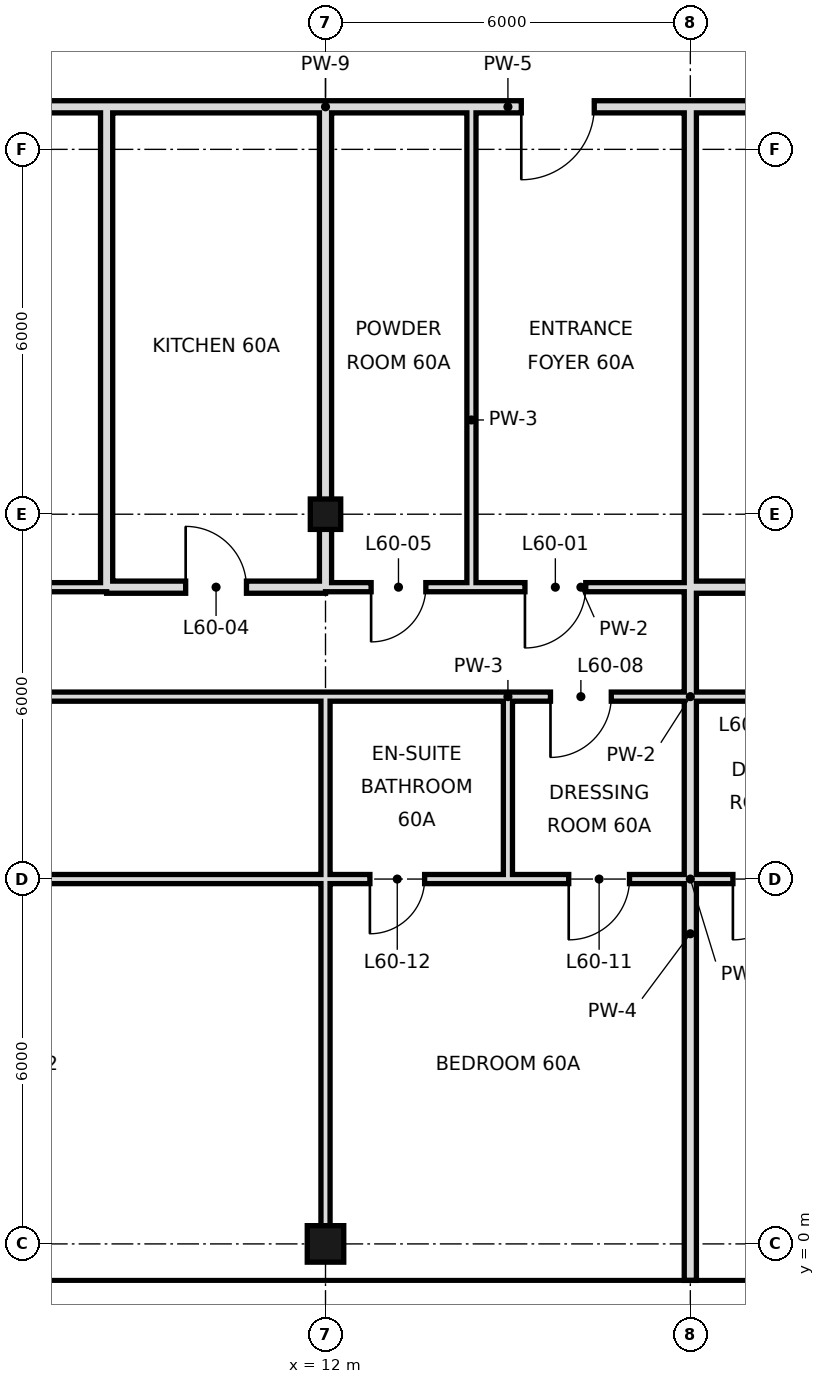
"""IFC4 building model, lengths in metres.
Left out: names, types, materials, properties, quantities, classifications, styles, units other than length and angle.
Written with IfcOpenShell. Run it as: python <this file> out.ifc"""

import sys

from ifc_helpers import new_model, si_unit, direction, frame, frame_2d, origin, origin_2d, place, context, subcontext, project, spatial, rectangle, hollow_rectangle, extrude, element, fill, save


model = new_model("IFC4")
c1 = context("Model", 3, precision=1e-05, world=origin(), true_north=direction((0.0, 1.0)))
c2 = subcontext(c1, "Body", "Model", "MODEL_VIEW")
j1 = project(units=[si_unit("LENGTHUNIT", "METRE"), si_unit("PLANEANGLEUNIT", "RADIAN")], contexts=[c1])
p1 = place(None, origin())
s1 = spatial("IfcSite", under=j1, at=p1, CompositionType="ELEMENT")
p2 = place(p1, origin())
s2 = spatial("IfcBuilding", under=s1, at=p2, CompositionType="ELEMENT")
p3 = place(p2, frame((0.0, 0.0, 254.0)))
s3 = spatial("IfcBuildingStorey", under=s2, at=p3, CompositionType="ELEMENT", Elevation=254.0)
p4 = place(p3, frame((12.0, 0.0, 0.0), z_axis=(0.0, 0.0, 1.0), x_axis=(1.0, 0.0, 0.0)))
e1 = element("IfcColumn", 1, at=p4, inside=s3, PredefinedType="COLUMN", context=c2, shape_type="SweptSolid", body=[
    extrude(hollow_rectangle(XDim=0.6, YDim=0.6, WallThickness=0.028, at=origin_2d()), origin(), (0.0, 0.0, 1.0), 3.6),
])
p5 = place(p3, frame((12.0, 12.0, 0.0), z_axis=(0.0, 0.0, 1.0), x_axis=(1.0, 0.0, 0.0)))
e2 = element("IfcColumn", 2, at=p5, inside=s3, PredefinedType="COLUMN", context=c2, shape_type="SweptSolid", body=[
    extrude(hollow_rectangle(XDim=0.5, YDim=0.5, WallThickness=0.025, at=origin_2d()), origin(), (0.0, 0.0, 1.0), 3.6),
])
p6 = place(p3, frame((12.0, 10.8, 0.0), z_axis=(0.0, 0.0, 1.0), x_axis=(0.0, 1.0, 0.0)))
e3 = element("IfcWall", 3, at=p6, inside=s3, PredefinedType="SOLIDWALL", context=c2, shape_type="SweptSolid", body=[
    extrude(rectangle(XDim=7.9, YDim=0.2, at=frame_2d((3.95, 0.0))), origin(), (0.0, 0.0, 1.0), 2.68),
])
p7 = place(p3, frame((12.0, 0.0, 0.0), z_axis=(0.0, 0.0, 1.0), x_axis=(0.0, 1.0, 0.0)))
e4 = element("IfcWall", 4, at=p7, inside=s3, PredefinedType="PARTITIONING", context=c2, shape_type="SweptSolid", body=[
    extrude(rectangle(XDim=6.0, YDim=0.15, at=frame_2d((3.0, 0.0))), origin(), (0.0, 0.0, 1.0), 2.68),
])
p8 = place(p3, frame((12.0, 6.0, 0.0), z_axis=(0.0, 0.0, 1.0), x_axis=(0.0, 1.0, 0.0)))
e5 = element("IfcWall", 5, at=p8, inside=s3, PredefinedType="PARTITIONING", context=c2, shape_type="SweptSolid", body=[
    extrude(rectangle(XDim=3.0, YDim=0.15, at=frame_2d((1.5, 0.0))), origin(), (0.0, 0.0, 1.0), 2.68),
])
p9 = place(p3, frame((14.4, 10.8, 0.0), z_axis=(0.0, 0.0, 1.0), x_axis=(0.0, 1.0, 0.0)))
e6 = element("IfcWall", 6, at=p9, inside=s3, PredefinedType="PARTITIONING", context=c2, shape_type="SweptSolid", body=[
    extrude(rectangle(XDim=7.9, YDim=0.15, at=frame_2d((3.95, 0.0))), origin(), (0.0, 0.0, 1.0), 3.38),
])
p10 = place(p3, frame((15.0, 6.0, 0.0), z_axis=(0.0, 0.0, 1.0), x_axis=(0.0, 1.0, 0.0)))
e7 = element("IfcWall", 7, at=p10, inside=s3, PredefinedType="PARTITIONING", context=c2, shape_type="SweptSolid", body=[
    extrude(rectangle(XDim=3.0, YDim=0.15, at=frame_2d((1.5, 0.0))), origin(), (0.0, 0.0, 1.0), 3.38),
])
p11 = place(p3, frame((18.0, 10.8, 0.0), z_axis=(0.0, 0.0, 1.0), x_axis=(0.0, 1.0, 0.0)))
e8 = element("IfcWall", 8, at=p11, inside=s3, PredefinedType="SOLIDWALL", context=c2, shape_type="SweptSolid", body=[
    extrude(rectangle(XDim=7.9, YDim=0.2, at=frame_2d((3.95, 0.0))), origin(), (0.0, 0.0, 1.0), 2.68),
])
p12 = place(p3, frame((18.0, -0.6, 0.0), z_axis=(0.0, 0.0, 1.0), x_axis=(0.0, 1.0, 0.0)))
e9 = element("IfcWall", 9, at=p12, inside=s3, PredefinedType="SOLIDWALL", context=c2, shape_type="SweptSolid", body=[
    extrude(rectangle(XDim=11.4, YDim=0.2, at=frame_2d((5.7, 0.0))), origin(), (0.0, 0.0, 1.0), 2.68),
])
p13 = place(p3, frame((8.4, 10.8, 0.0), z_axis=(0.0, 0.0, 1.0), x_axis=(0.0, 1.0, 0.0)))
e10 = element("IfcWall", 10, at=p13, inside=s3, PredefinedType="SOLIDWALL", context=c2, shape_type="SweptSolid", body=[
    extrude(rectangle(XDim=7.9, YDim=0.2, at=frame_2d((3.95, 0.0))), origin(), (0.0, 0.0, 1.0), 2.68),
])
p14 = place(p3, frame((8.4, 10.8, 0.0), z_axis=(0.0, 0.0, 1.0), x_axis=(1.0, 0.0, 0.0)))
e11 = element("IfcWall", 11, at=p14, inside=s3, PredefinedType="SOLIDWALL", context=c2, shape_type="SweptSolid", body=[
    extrude(rectangle(XDim=3.6, YDim=0.2, at=frame_2d((1.8, 0.0))), origin(), (0.0, 0.0, 1.0), 2.68),
])
p15 = place(p14, frame((1.3, 0.0, 0.0)))
e12 = element("IfcOpeningElement", 12, at=p15, cuts=e11, PredefinedType="OPENING", context=c2, shape_type="SweptSolid", body=[
    extrude(rectangle(XDim=1.0, YDim=2.4, at=frame_2d((0.5, 1.2))), frame((0.0, 0.11, 0.0), z_axis=(0.0, -1.0, 0.0), x_axis=(1.0, 0.0, 0.0)), (0.0, 0.0, 1.0), 0.22),
])
p16 = place(p3, frame((18.0, 10.8, 0.0), z_axis=(0.0, 0.0, 1.0), x_axis=(1.0, 0.0, 0.0)))
e13 = element("IfcWall", 13, at=p16, inside=s3, PredefinedType="SOLIDWALL", context=c2, shape_type="SweptSolid", body=[
    extrude(rectangle(XDim=5.4, YDim=0.2, at=frame_2d((2.7, 0.0))), origin(), (0.0, 0.0, 1.0), 2.68),
])
p17 = place(p16, frame((2.2, 0.0, 0.0)))
e14 = element("IfcOpeningElement", 14, at=p17, cuts=e13, PredefinedType="OPENING", context=c2, shape_type="SweptSolid", body=[
    extrude(rectangle(XDim=1.0, YDim=2.4, at=frame_2d((0.5, 1.2))), frame((0.0, 0.11, 0.0), z_axis=(0.0, -1.0, 0.0), x_axis=(1.0, 0.0, 0.0)), (0.0, 0.0, 1.0), 0.22),
])
p18 = place(p3, frame((-12.6, 10.8, 0.0), z_axis=(0.0, 0.0, 1.0), x_axis=(1.0, 0.0, 0.0)))
e15 = element("IfcWall", 15, at=p18, inside=s3, PredefinedType="PARTITIONING", context=c2, shape_type="SweptSolid", body=[
    extrude(rectangle(XDim=21.0, YDim=0.15, at=frame_2d((10.5, 0.0))), origin(), (0.0, 0.0, 1.0), 3.38),
])
p19 = place(p18, frame((10.3, 0.0, 0.0)))
e16 = element("IfcOpeningElement", 16, at=p19, cuts=e15, PredefinedType="OPENING", context=c2, shape_type="SweptSolid", body=[
    extrude(rectangle(XDim=1.0, YDim=2.4, at=frame_2d((0.5, 1.2))), frame((0.0, 0.085, 0.0), z_axis=(0.0, -1.0, 0.0), x_axis=(1.0, 0.0, 0.0)), (0.0, 0.0, 1.0), 0.17),
])
p20 = place(p18, frame((17.68, 0.0, 0.0)))
e17 = element("IfcOpeningElement", 17, at=p20, cuts=e15, PredefinedType="OPENING", context=c2, shape_type="SweptSolid", body=[
    extrude(rectangle(XDim=1.0, YDim=2.4, at=frame_2d((0.5, 1.2))), frame((0.0, 0.085, 0.0), z_axis=(0.0, -1.0, 0.0), x_axis=(1.0, 0.0, 0.0)), (0.0, 0.0, 1.0), 0.17),
])
p21 = place(p3, frame((14.4, 10.8, 0.0), z_axis=(0.0, 0.0, 1.0), x_axis=(1.0, 0.0, 0.0)))
e18 = element("IfcWall", 18, at=p21, inside=s3, PredefinedType="PARTITIONING", context=c2, shape_type="SweptSolid", body=[
    extrude(rectangle(XDim=3.6, YDim=0.15, at=frame_2d((1.8, 0.0))), origin(), (0.0, 0.0, 1.0), 3.38),
])
p22 = place(p21, frame((0.88, 0.0, 0.0)))
e19 = element("IfcOpeningElement", 19, at=p22, cuts=e18, PredefinedType="OPENING", context=c2, shape_type="SweptSolid", body=[
    extrude(rectangle(XDim=1.0, YDim=2.4, at=frame_2d((0.5, 1.2))), frame((0.0, 0.085, 0.0), z_axis=(0.0, -1.0, 0.0), x_axis=(1.0, 0.0, 0.0)), (0.0, 0.0, 1.0), 0.17),
])
p23 = place(p3, frame((12.0, 10.8, 0.0), z_axis=(0.0, 0.0, 1.0), x_axis=(1.0, 0.0, 0.0)))
e20 = element("IfcWall", 20, at=p23, inside=s3, PredefinedType="PARTITIONING", context=c2, shape_type="SweptSolid", body=[
    extrude(rectangle(XDim=2.4, YDim=0.15, at=frame_2d((1.2, 0.0))), origin(), (0.0, 0.0, 1.0), 3.38),
])
p24 = place(p23, frame((0.75, 0.0, 0.0)))
e21 = element("IfcOpeningElement", 21, at=p24, cuts=e20, PredefinedType="OPENING", context=c2, shape_type="SweptSolid", body=[
    extrude(rectangle(XDim=0.9, YDim=2.4, at=frame_2d((0.45, 1.2))), frame((0.0, 0.085, 0.0), z_axis=(0.0, -1.0, 0.0), x_axis=(1.0, 0.0, 0.0)), (0.0, 0.0, 1.0), 0.17),
])
p25 = place(p3, frame((3.1, 18.7, 0.0), z_axis=(0.0, 0.0, 1.0), x_axis=(1.0, 0.0, 0.0)))
e22 = element("IfcWall", 22, at=p25, inside=s3, PredefinedType="SOLIDWALL", context=c2, shape_type="SweptSolid", body=[
    extrude(rectangle(XDim=5.3, YDim=0.2, at=frame_2d((2.65, 0.0))), origin(), (0.0, 0.0, 1.0), 2.68),
])
p26 = place(p3, frame((12.0, 18.7, 0.0), z_axis=(0.0, 0.0, 1.0), x_axis=(1.0, 0.0, 0.0)))
e23 = element("IfcWall", 23, at=p26, inside=s3, PredefinedType="SOLIDWALL", context=c2, shape_type="SweptSolid", body=[
    extrude(rectangle(XDim=6.0, YDim=0.2, at=frame_2d((3.0, 0.0))), origin(), (0.0, 0.0, 1.0), 2.68),
])
p27 = place(p26, frame((3.22, 0.0, 0.0)))
e24 = element("IfcOpeningElement", 24, at=p27, cuts=e23, PredefinedType="OPENING", context=c2, shape_type="SweptSolid", body=[
    extrude(rectangle(XDim=1.2, YDim=2.4, at=frame_2d((0.6, 1.2))), frame((0.0, 0.11, 0.0), z_axis=(0.0, -1.0, 0.0), x_axis=(1.0, 0.0, 0.0)), (0.0, 0.0, 1.0), 0.22),
])
p28 = place(p3, frame((8.4, 18.7, 0.0), z_axis=(0.0, 0.0, 1.0), x_axis=(1.0, 0.0, 0.0)))
e25 = element("IfcWall", 25, at=p28, inside=s3, PredefinedType="SOLIDWALL", context=c2, shape_type="SweptSolid", body=[
    extrude(rectangle(XDim=3.6, YDim=0.2, at=frame_2d((1.8, 0.0))), origin(), (0.0, 0.0, 1.0), 3.38),
])
p29 = place(p3, frame((18.0, 18.7, 0.0), z_axis=(0.0, 0.0, 1.0), x_axis=(1.0, 0.0, 0.0)))
e26 = element("IfcWall", 26, at=p29, inside=s3, PredefinedType="SOLIDWALL", context=c2, shape_type="SweptSolid", body=[
    extrude(rectangle(XDim=5.4, YDim=0.2, at=frame_2d((2.7, 0.0))), origin(), (0.0, 0.0, 1.0), 2.68),
])
p30 = place(p3, frame((-12.0, 6.0, 0.0), z_axis=(0.0, 0.0, 1.0), x_axis=(1.0, 0.0, 0.0)))
e27 = element("IfcWall", 27, at=p30, inside=s3, PredefinedType="PARTITIONING", context=c2, shape_type="SweptSolid", body=[
    extrude(rectangle(XDim=24.0, YDim=0.15, at=frame_2d((12.0, 0.0))), origin(), (0.0, 0.0, 1.0), 2.68),
])
p31 = place(p30, frame((9.95, 0.0, 0.0)))
e28 = element("IfcOpeningElement", 28, at=p31, cuts=e27, PredefinedType="OPENING", context=c2, shape_type="SweptSolid", body=[
    extrude(rectangle(XDim=1.8, YDim=2.4, at=frame_2d((0.9, 1.2))), frame((0.0, 0.085, 0.0), z_axis=(0.0, -1.0, 0.0), x_axis=(1.0, 0.0, 0.0)), (0.0, 0.0, 1.0), 0.17),
])
p32 = place(p30, frame((15.16, 0.0, 0.0)))
e29 = element("IfcOpeningElement", 29, at=p32, cuts=e27, PredefinedType="OPENING", context=c2, shape_type="SweptSolid", body=[
    extrude(rectangle(XDim=1.8, YDim=2.4, at=frame_2d((0.9, 1.2))), frame((0.0, 0.085, 0.0), z_axis=(0.0, -1.0, 0.0), x_axis=(1.0, 0.0, 0.0)), (0.0, 0.0, 1.0), 0.17),
])
p33 = place(p3, frame((15.0, 6.0, 0.0), z_axis=(0.0, 0.0, 1.0), x_axis=(1.0, 0.0, 0.0)))
e30 = element("IfcWall", 30, at=p33, inside=s3, PredefinedType="PARTITIONING", context=c2, shape_type="SweptSolid", body=[
    extrude(rectangle(XDim=6.0, YDim=0.15, at=frame_2d((3.0, 0.0))), origin(), (0.0, 0.0, 1.0), 2.93),
])
p34 = place(p33, frame((1.0, 0.0, 0.0)))
e31 = element("IfcOpeningElement", 31, at=p34, cuts=e30, PredefinedType="OPENING", context=c2, shape_type="SweptSolid", body=[
    extrude(rectangle(XDim=1.0, YDim=2.4, at=frame_2d((0.5, 1.2))), frame((0.0, 0.085, 0.0), z_axis=(0.0, -1.0, 0.0), x_axis=(1.0, 0.0, 0.0)), (0.0, 0.0, 1.0), 0.17),
])
p35 = place(p33, frame((3.7, 0.0, 0.0)))
e32 = element("IfcOpeningElement", 32, at=p35, cuts=e30, PredefinedType="OPENING", context=c2, shape_type="SweptSolid", body=[
    extrude(rectangle(XDim=1.0, YDim=2.4, at=frame_2d((0.5, 1.2))), frame((0.0, 0.085, 0.0), z_axis=(0.0, -1.0, 0.0), x_axis=(1.0, 0.0, 0.0)), (0.0, 0.0, 1.0), 0.17),
])
p36 = place(p3, frame((12.0, 6.0, 0.0), z_axis=(0.0, 0.0, 1.0), x_axis=(1.0, 0.0, 0.0)))
e33 = element("IfcWall", 33, at=p36, inside=s3, PredefinedType="PARTITIONING", context=c2, shape_type="SweptSolid", body=[
    extrude(rectangle(XDim=3.0, YDim=0.15, at=frame_2d((1.5, 0.0))), origin(), (0.0, 0.0, 1.0), 2.93),
])
p37 = place(p36, frame((0.73, 0.0, 0.0)))
e34 = element("IfcOpeningElement", 34, at=p37, cuts=e33, PredefinedType="OPENING", context=c2, shape_type="SweptSolid", body=[
    extrude(rectangle(XDim=0.9, YDim=2.4, at=frame_2d((0.45, 1.2))), frame((0.0, 0.085, 0.0), z_axis=(0.0, -1.0, 0.0), x_axis=(1.0, 0.0, 0.0)), (0.0, 0.0, 1.0), 0.17),
])
p38 = place(p3, frame((-12.6, 9.0, 0.0), z_axis=(0.0, 0.0, 1.0), x_axis=(1.0, 0.0, 0.0)))
e35 = element("IfcWall", 35, at=p38, inside=s3, PredefinedType="PARTITIONING", context=c2, shape_type="SweptSolid", body=[
    extrude(rectangle(XDim=24.6, YDim=0.15, at=frame_2d((12.3, 0.0))), origin(), (0.0, 0.0, 1.0), 3.38),
])
p39 = place(p38, frame((10.55, 0.0, 0.0)))
e36 = element("IfcOpeningElement", 36, at=p39, cuts=e35, PredefinedType="OPENING", context=c2, shape_type="SweptSolid", body=[
    extrude(rectangle(XDim=1.8, YDim=2.4, at=frame_2d((0.9, 1.2))), frame((0.0, 0.085, 0.0), z_axis=(0.0, -1.0, 0.0), x_axis=(1.0, 0.0, 0.0)), (0.0, 0.0, 1.0), 0.17),
])
p40 = place(p38, frame((15.76, 0.0, 0.0)))
e37 = element("IfcOpeningElement", 37, at=p40, cuts=e35, PredefinedType="OPENING", context=c2, shape_type="SweptSolid", body=[
    extrude(rectangle(XDim=1.8, YDim=2.4, at=frame_2d((0.9, 1.2))), frame((0.0, 0.085, 0.0), z_axis=(0.0, -1.0, 0.0), x_axis=(1.0, 0.0, 0.0)), (0.0, 0.0, 1.0), 0.17),
])
p41 = place(p3, frame((15.0, 9.0, 0.0), z_axis=(0.0, 0.0, 1.0), x_axis=(1.0, 0.0, 0.0)))
e38 = element("IfcWall", 38, at=p41, inside=s3, PredefinedType="PARTITIONING", context=c2, shape_type="SweptSolid", body=[
    extrude(rectangle(XDim=6.0, YDim=0.15, at=frame_2d((3.0, 0.0))), origin(), (0.0, 0.0, 1.0), 3.38),
])
p42 = place(p41, frame((0.7, 0.0, 0.0)))
e39 = element("IfcOpeningElement", 39, at=p42, cuts=e38, PredefinedType="OPENING", context=c2, shape_type="SweptSolid", body=[
    extrude(rectangle(XDim=1.0, YDim=2.4, at=frame_2d((0.5, 1.2))), frame((0.0, 0.085, 0.0), z_axis=(0.0, -1.0, 0.0), x_axis=(1.0, 0.0, 0.0)), (0.0, 0.0, 1.0), 0.17),
])
p43 = place(p41, frame((4.0, 0.0, 0.0)))
e40 = element("IfcOpeningElement", 40, at=p43, cuts=e38, PredefinedType="OPENING", context=c2, shape_type="SweptSolid", body=[
    extrude(rectangle(XDim=1.0, YDim=2.4, at=frame_2d((0.5, 1.2))), frame((0.0, 0.085, 0.0), z_axis=(0.0, -1.0, 0.0), x_axis=(1.0, 0.0, 0.0)), (0.0, 0.0, 1.0), 0.17),
])
p44 = place(p3, frame((12.0, 9.0, 0.0), z_axis=(0.0, 0.0, 1.0), x_axis=(1.0, 0.0, 0.0)))
e41 = element("IfcWall", 41, at=p44, inside=s3, PredefinedType="PARTITIONING", context=c2, shape_type="SweptSolid", body=[
    extrude(rectangle(XDim=3.0, YDim=0.15, at=frame_2d((1.5, 0.0))), origin(), (0.0, 0.0, 1.0), 3.38),
])
p45 = place(p22, frame((1.0, 0.0, 0.0), z_axis=(0.0, 0.0, 1.0), x_axis=(-1.0, 0.0, 0.0)))
e42 = element("IfcDoor", 42, at=p45, inside=s3, OperationType="SINGLE_SWING_RIGHT", PredefinedType="DOOR", context=c2, shape_type="SweptSolid", body=[
    extrude(rectangle(XDim=1.0, YDim=2.4, at=frame_2d((0.5, 1.2))), frame((0.0, 0.025, 0.0), z_axis=(0.0, -1.0, 0.0), x_axis=(1.0, 0.0, 0.0)), (0.0, 0.0, 1.0), 0.05),
])
fill(e19, e42)
p46 = place(p15, origin())
e43 = element("IfcDoor", 43, at=p46, inside=s3, OperationType="SINGLE_SWING_LEFT", PredefinedType="DOOR", context=c2, shape_type="SweptSolid", body=[
    extrude(rectangle(XDim=1.0, YDim=2.4, at=frame_2d((0.5, 1.2))), frame((0.0, 0.025, 0.0), z_axis=(0.0, -1.0, 0.0), x_axis=(1.0, 0.0, 0.0)), (0.0, 0.0, 1.0), 0.05),
])
fill(e12, e43)
p47 = place(p24, frame((0.9, 0.0, 0.0), z_axis=(0.0, 0.0, 1.0), x_axis=(-1.0, 0.0, 0.0)))
e44 = element("IfcDoor", 44, at=p47, inside=s3, OperationType="SINGLE_SWING_RIGHT", PredefinedType="DOOR", context=c2, shape_type="SweptSolid", body=[
    extrude(rectangle(XDim=0.9, YDim=2.4, at=frame_2d((0.45, 1.2))), frame((0.0, 0.025, 0.0), z_axis=(0.0, -1.0, 0.0), x_axis=(1.0, 0.0, 0.0)), (0.0, 0.0, 1.0), 0.05),
])
fill(e21, e44)
p48 = place(p42, frame((1.0, 0.0, 0.0), z_axis=(0.0, 0.0, 1.0), x_axis=(-1.0, 0.0, 0.0)))
e45 = element("IfcDoor", 45, at=p48, inside=s3, OperationType="SINGLE_SWING_RIGHT", PredefinedType="DOOR", context=c2, shape_type="SweptSolid", body=[
    extrude(rectangle(XDim=1.0, YDim=2.4, at=frame_2d((0.5, 1.2))), frame((0.0, 0.025, 0.0), z_axis=(0.0, -1.0, 0.0), x_axis=(1.0, 0.0, 0.0)), (0.0, 0.0, 1.0), 0.05),
])
fill(e39, e45)
p49 = place(p34, frame((1.0, 0.0, 0.0), z_axis=(0.0, 0.0, 1.0), x_axis=(-1.0, 0.0, 0.0)))
e46 = element("IfcDoor", 46, at=p49, inside=s3, OperationType="SINGLE_SWING_RIGHT", PredefinedType="DOOR", context=c2, shape_type="SweptSolid", body=[
    extrude(rectangle(XDim=1.0, YDim=2.4, at=frame_2d((0.5, 1.2))), frame((0.0, 0.025, 0.0), z_axis=(0.0, -1.0, 0.0), x_axis=(1.0, 0.0, 0.0)), (0.0, 0.0, 1.0), 0.05),
])
fill(e31, e46)
p50 = place(p37, frame((0.9, 0.0, 0.0), z_axis=(0.0, 0.0, 1.0), x_axis=(-1.0, 0.0, 0.0)))
e47 = element("IfcDoor", 47, at=p50, inside=s3, OperationType="SINGLE_SWING_RIGHT", PredefinedType="DOOR", context=c2, shape_type="SweptSolid", body=[
    extrude(rectangle(XDim=0.9, YDim=2.4, at=frame_2d((0.45, 1.2))), frame((0.0, 0.025, 0.0), z_axis=(0.0, -1.0, 0.0), x_axis=(1.0, 0.0, 0.0)), (0.0, 0.0, 1.0), 0.05),
])
fill(e34, e47)
p51 = place(p35, frame((1.0, 0.0, 0.0), z_axis=(0.0, 0.0, 1.0), x_axis=(-1.0, 0.0, 0.0)))
e48 = element("IfcDoor", 48, at=p51, inside=s3, OperationType="SINGLE_SWING_RIGHT", PredefinedType="DOOR", context=c2, shape_type="SweptSolid", body=[
    extrude(rectangle(XDim=1.0, YDim=2.4, at=frame_2d((0.5, 1.2))), frame((0.0, 0.025, 0.0), z_axis=(0.0, -1.0, 0.0), x_axis=(1.0, 0.0, 0.0)), (0.0, 0.0, 1.0), 0.05),
])
fill(e32, e48)
p52 = place(p27, frame((1.2, 0.0, 0.0), z_axis=(0.0, 0.0, 1.0), x_axis=(-1.0, 0.0, 0.0)))
e49 = element("IfcDoor", 49, at=p52, inside=s3, OperationType="SINGLE_SWING_RIGHT", PredefinedType="DOOR", context=c2, shape_type="SweptSolid", body=[
    extrude(rectangle(XDim=1.2, YDim=2.4, at=frame_2d((0.6, 1.2))), frame((0.0, 0.025, 0.0), z_axis=(0.0, -1.0, 0.0), x_axis=(1.0, 0.0, 0.0)), (0.0, 0.0, 1.0), 0.05),
])
fill(e24, e49)
save(model, sys.argv[1])
